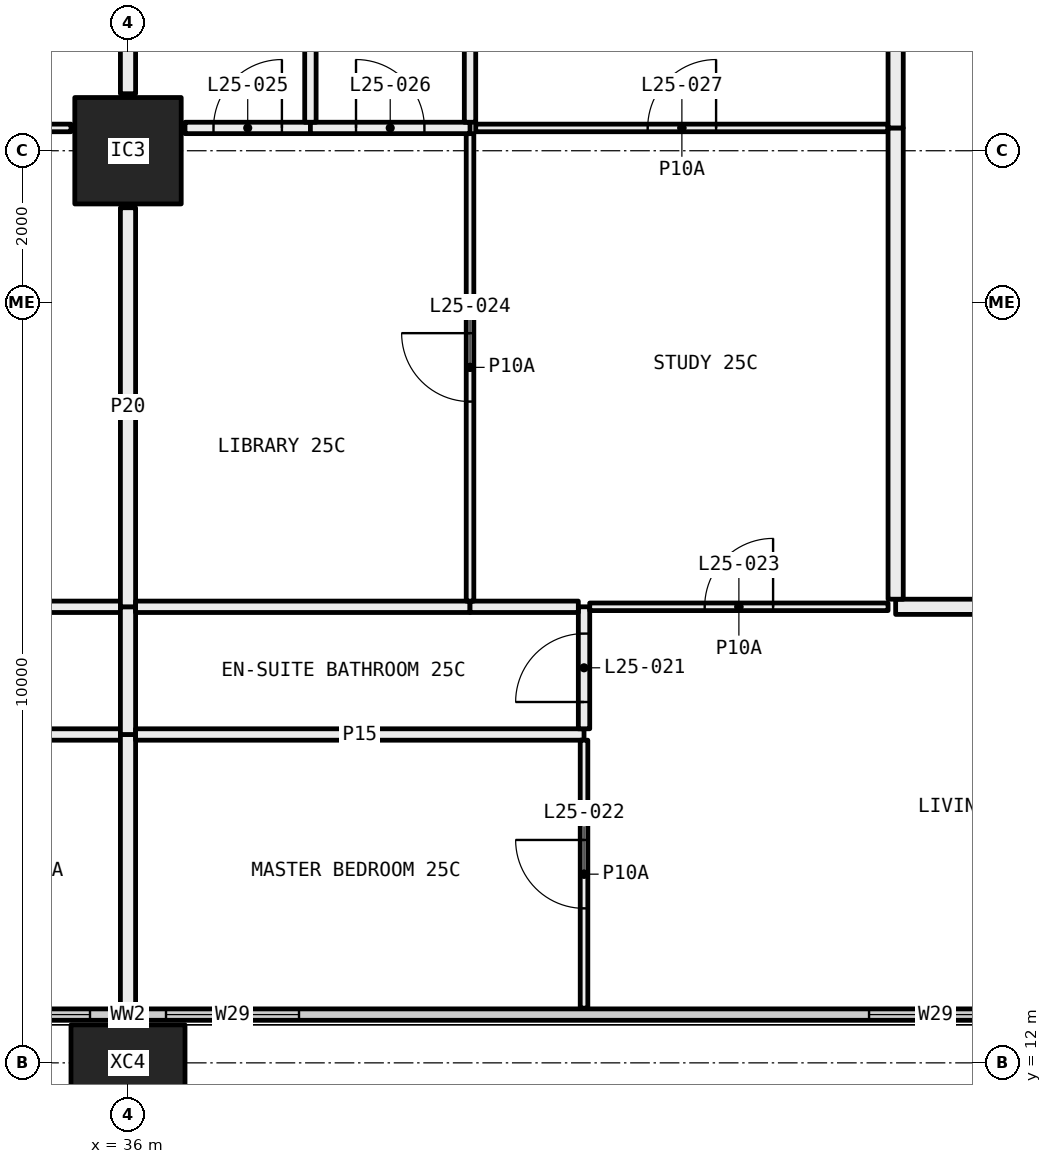
"""IFC4 building model, lengths in metres.
Left out: names, types, materials, properties, quantities, classifications, styles, units other than length and angle.
Written with IfcOpenShell. Run it as: python <this file> out.ifc"""

import sys

from ifc_helpers import new_model, si_unit, direction, frame, frame_2d, origin, origin_2d, place, context, subcontext, project, spatial, rectangle, hollow_rectangle, extrude, element, fill, save


model = new_model("IFC4")
c1 = context("Model", 3, precision=1e-05, world=origin(), true_north=direction((0.0, 1.0)))
c2 = subcontext(c1, "Body", "Model", "MODEL_VIEW")
j1 = project(units=[si_unit("LENGTHUNIT", "METRE"), si_unit("PLANEANGLEUNIT", "RADIAN")], contexts=[c1])
p1 = place(None, origin())
s1 = spatial("IfcSite", under=j1, at=p1, CompositionType="ELEMENT")
p2 = place(p1, origin())
s2 = spatial("IfcBuilding", under=s1, at=p2, CompositionType="ELEMENT")
p3 = place(p2, frame((0.0, 0.0, 100.05)))
s3 = spatial("IfcBuildingStorey", under=s2, at=p3, CompositionType="ELEMENT", Elevation=100.05)
p4 = place(p3, frame((36.0, 12.0, -0.4), z_axis=(0.0, 0.0, 1.0), x_axis=(1.0, 0.0, 0.0)))
e1 = element("IfcColumn", 1, at=p4, inside=s3, PredefinedType="COLUMN", context=c2, shape_type="SweptSolid", body=[
    extrude(hollow_rectangle(XDim=1.5, YDim=1.0, WallThickness=0.06, at=origin_2d()), origin(), (0.0, 0.0, 1.0), 3.45),
])
p5 = place(p3, frame((36.0, 24.0, 0.0), z_axis=(0.0, 0.0, 1.0), x_axis=(1.0, 0.0, 0.0)))
e2 = element("IfcColumn", 2, at=p5, inside=s3, PredefinedType="COLUMN", context=c2, shape_type="SweptSolid", body=[
    extrude(hollow_rectangle(XDim=1.4, YDim=1.4, WallThickness=0.06, at=origin_2d()), origin(), (0.0, 0.0, 1.0), 3.05),
])
p6 = place(p3, frame((6.56, 12.635, 0.0), z_axis=(0.0, 0.0, 1.0), x_axis=(1.0, 0.0, 0.0)))
e3 = element("IfcWall", 3, at=p6, inside=s3, PredefinedType="ELEMENTEDWALL", context=c2, shape_type="SweptSolid", body=[
    extrude(rectangle(XDim=58.88, YDim=0.15, at=frame_2d((29.44, 0.0))), origin(), (0.0, 0.0, 1.0), 3.05),
])
p7 = place(p6, frame((0.44, 0.0, 0.45)))
e4 = element("IfcOpeningElement", 4, at=p7, cuts=e3, PredefinedType="OPENING", context=c2, shape_type="SweptSolid", body=[
    extrude(rectangle(XDim=4.5, YDim=2.55, at=frame_2d((2.25, 1.275))), frame((0.0, 0.085, 0.0), z_axis=(0.0, -1.0, 0.0), x_axis=(1.0, 0.0, 0.0)), (0.0, 0.0, 1.0), 0.17),
])
p8 = place(p6, frame((5.94, 0.0, 0.45)))
e5 = element("IfcOpeningElement", 5, at=p8, cuts=e3, PredefinedType="OPENING", context=c2, shape_type="SweptSolid", body=[
    extrude(rectangle(XDim=1.75, YDim=2.55, at=frame_2d((0.875, 1.275))), frame((0.0, 0.085, 0.0), z_axis=(0.0, -1.0, 0.0), x_axis=(1.0, 0.0, 0.0)), (0.0, 0.0, 1.0), 0.17),
])
p9 = place(p6, frame((15.19, 0.0, 0.45)))
e6 = element("IfcOpeningElement", 6, at=p9, cuts=e3, PredefinedType="OPENING", context=c2, shape_type="SweptSolid", body=[
    extrude(rectangle(XDim=1.75, YDim=2.55, at=frame_2d((0.875, 1.275))), frame((0.0, 0.085, 0.0), z_axis=(0.0, -1.0, 0.0), x_axis=(1.0, 0.0, 0.0)), (0.0, 0.0, 1.0), 0.17),
])
p10 = place(p6, frame((17.94, 0.0, 0.45)))
e7 = element("IfcOpeningElement", 7, at=p10, cuts=e3, PredefinedType="OPENING", context=c2, shape_type="SweptSolid", body=[
    extrude(rectangle(XDim=1.75, YDim=2.55, at=frame_2d((0.875, 1.275))), frame((0.0, 0.085, 0.0), z_axis=(0.0, -1.0, 0.0), x_axis=(1.0, 0.0, 0.0)), (0.0, 0.0, 1.0), 0.17),
])
p11 = place(p6, frame((27.19, 0.0, 0.45)))
e8 = element("IfcOpeningElement", 8, at=p11, cuts=e3, PredefinedType="OPENING", context=c2, shape_type="SweptSolid", body=[
    extrude(rectangle(XDim=1.75, YDim=2.55, at=frame_2d((0.875, 1.275))), frame((0.0, 0.085, 0.0), z_axis=(0.0, -1.0, 0.0), x_axis=(1.0, 0.0, 0.0)), (0.0, 0.0, 1.0), 0.17),
])
p12 = place(p6, frame((29.94, 0.0, 0.45)))
e9 = element("IfcOpeningElement", 9, at=p12, cuts=e3, PredefinedType="OPENING", context=c2, shape_type="SweptSolid", body=[
    extrude(rectangle(XDim=1.75, YDim=2.55, at=frame_2d((0.875, 1.275))), frame((0.0, 0.085, 0.0), z_axis=(0.0, -1.0, 0.0), x_axis=(1.0, 0.0, 0.0)), (0.0, 0.0, 1.0), 0.17),
])
p13 = place(p6, frame((39.19, 0.0, 0.45)))
e10 = element("IfcOpeningElement", 10, at=p13, cuts=e3, PredefinedType="OPENING", context=c2, shape_type="SweptSolid", body=[
    extrude(rectangle(XDim=1.75, YDim=2.55, at=frame_2d((0.875, 1.275))), frame((0.0, 0.085, 0.0), z_axis=(0.0, -1.0, 0.0), x_axis=(1.0, 0.0, 0.0)), (0.0, 0.0, 1.0), 0.17),
])
p14 = place(p6, frame((41.94, 0.0, 0.45)))
e11 = element("IfcOpeningElement", 11, at=p14, cuts=e3, PredefinedType="OPENING", context=c2, shape_type="SweptSolid", body=[
    extrude(rectangle(XDim=1.75, YDim=2.55, at=frame_2d((0.875, 1.275))), frame((0.0, 0.085, 0.0), z_axis=(0.0, -1.0, 0.0), x_axis=(1.0, 0.0, 0.0)), (0.0, 0.0, 1.0), 0.17),
])
p15 = place(p6, frame((51.19, 0.0, 0.45)))
e12 = element("IfcOpeningElement", 12, at=p15, cuts=e3, PredefinedType="OPENING", context=c2, shape_type="SweptSolid", body=[
    extrude(rectangle(XDim=1.75, YDim=2.55, at=frame_2d((0.875, 1.275))), frame((0.0, 0.085, 0.0), z_axis=(0.0, -1.0, 0.0), x_axis=(1.0, 0.0, 0.0)), (0.0, 0.0, 1.0), 0.17),
])
p16 = place(p6, frame((53.94, 0.0, 0.45)))
e13 = element("IfcOpeningElement", 13, at=p16, cuts=e3, PredefinedType="OPENING", context=c2, shape_type="SweptSolid", body=[
    extrude(rectangle(XDim=4.5, YDim=2.55, at=frame_2d((2.25, 1.275))), frame((0.0, 0.085, 0.0), z_axis=(0.0, -1.0, 0.0), x_axis=(1.0, 0.0, 0.0)), (0.0, 0.0, 1.0), 0.17),
])
p17 = place(p3, frame((35.9, 16.32, 0.0), z_axis=(0.0, 0.0, 1.0), x_axis=(-1.0, 0.0, 0.0)))
e14 = element("IfcWall", 14, at=p17, inside=s3, PredefinedType="PARTITIONING", context=c2, shape_type="SweptSolid", body=[
    extrude(rectangle(XDim=5.825, YDim=0.15, at=frame_2d((2.913, 0.0))), origin(), (0.0, 0.0, 1.0), 3.05),
])
p18 = place(p3, frame((36.0, 12.72, 0.0), z_axis=(0.0, 0.0, 1.0), x_axis=(0.0, 1.0, 0.0)))
e15 = element("IfcWall", 15, at=p18, inside=s3, PredefinedType="PARTITIONING", context=c2, shape_type="SweptSolid", body=[
    extrude(rectangle(XDim=3.6, YDim=0.2, at=frame_2d((1.8, 0.0))), origin(), (0.0, 0.0, 1.0), 2.45),
])
p19 = place(p3, frame((35.9, 18.0, 0.0), z_axis=(0.0, 0.0, 1.0), x_axis=(-1.0, 0.0, 0.0)))
e16 = element("IfcWall", 16, at=p19, inside=s3, PredefinedType="PARTITIONING", context=c2, shape_type="SweptSolid", body=[
    extrude(rectangle(XDim=4.4, YDim=0.15, at=frame_2d((2.2, 0.0))), origin(), (0.0, 0.0, 1.0), 3.05),
])
p20 = place(p3, frame((36.0, 16.32, 0.0), z_axis=(0.0, 0.0, 1.0), x_axis=(0.0, 1.0, 0.0)))
e17 = element("IfcWall", 17, at=p20, inside=s3, PredefinedType="PARTITIONING", context=c2, shape_type="SweptSolid", body=[
    extrude(rectangle(XDim=1.68, YDim=0.2, at=frame_2d((0.84, 0.0))), origin(), (0.0, 0.0, 1.0), 2.45),
])
p21 = place(p3, frame((35.25, 24.3, 0.0), z_axis=(0.0, 0.0, 1.0), x_axis=(-1.0, 0.0, 0.0)))
e18 = element("IfcWall", 18, at=p21, inside=s3, PredefinedType="PARTITIONING", context=c2, shape_type="SweptSolid", body=[
    extrude(rectangle(XDim=3.7, YDim=0.1, at=frame_2d((1.85, 0.0))), origin(), (0.0, 0.0, 1.0), 3.05),
])
p22 = place(p21, frame((1.4, 0.0, 0.0)))
e19 = element("IfcOpeningElement", 19, at=p22, cuts=e18, PredefinedType="OPENING", context=c2, shape_type="SweptSolid", body=[
    extrude(rectangle(XDim=0.9, YDim=2.1, at=frame_2d((0.45, 1.05))), frame((0.0, 0.06, 0.0), z_axis=(0.0, -1.0, 0.0), x_axis=(1.0, 0.0, 0.0)), (0.0, 0.0, 1.0), 0.12),
])
p23 = place(p3, frame((36.0, 18.0, 0.0), z_axis=(0.0, 0.0, 1.0), x_axis=(0.0, 1.0, 0.0)))
e20 = element("IfcWall", 20, at=p23, inside=s3, PredefinedType="PARTITIONING", context=c2, shape_type="SweptSolid", body=[
    extrude(rectangle(XDim=5.25, YDim=0.2, at=frame_2d((2.625, 0.0))), origin(), (0.0, 0.0, 1.0), 2.45),
])
p24 = place(p3, frame((36.0, 24.75, 0.0), z_axis=(0.0, 0.0, 1.0), x_axis=(0.0, 1.0, 0.0)))
e21 = element("IfcWall", 21, at=p24, inside=s3, PredefinedType="PARTITIONING", context=c2, shape_type="SweptSolid", body=[
    extrude(rectangle(XDim=1.8, YDim=0.2, at=frame_2d((0.9, 0.0))), origin(), (0.0, 0.0, 1.0), 2.45),
])
p25 = place(p3, frame((42.0, 16.32, 0.0), z_axis=(0.0, 0.0, 1.0), x_axis=(-1.0, 0.0, 0.0)))
e22 = element("IfcWall", 22, at=p25, inside=s3, PredefinedType="PARTITIONING", context=c2, shape_type="SweptSolid", body=[
    extrude(rectangle(XDim=5.9, YDim=0.15, at=frame_2d((2.95, 0.0))), origin(), (0.0, 0.0, 1.0), 3.05),
])
p26 = place(p3, frame((42.0, 12.72, 0.0), z_axis=(0.0, 0.0, 1.0), x_axis=(0.0, 1.0, 0.0)))
e23 = element("IfcWall", 23, at=p26, inside=s3, PredefinedType="PARTITIONING", context=c2, shape_type="SweptSolid", body=[
    extrude(rectangle(XDim=3.525, YDim=0.1, at=frame_2d((1.763, 0.0))), origin(), (0.0, 0.0, 1.0), 3.05),
])
p27 = place(p26, frame((1.312, 0.0, 0.0)))
e24 = element("IfcOpeningElement", 24, at=p27, cuts=e23, PredefinedType="OPENING", context=c2, shape_type="SweptSolid", body=[
    extrude(rectangle(XDim=0.9, YDim=2.1, at=frame_2d((0.45, 1.05))), frame((0.0, 0.06, 0.0), z_axis=(0.0, -1.0, 0.0), x_axis=(1.0, 0.0, 0.0)), (0.0, 0.0, 1.0), 0.12),
])
p28 = place(p3, frame((42.0, 16.395, 0.0), z_axis=(0.0, 0.0, 1.0), x_axis=(0.0, 1.0, 0.0)))
e25 = element("IfcWall", 25, at=p28, inside=s3, PredefinedType="PARTITIONING", context=c2, shape_type="SweptSolid", body=[
    extrude(rectangle(XDim=1.605, YDim=0.15, at=frame_2d((0.802, 0.0))), origin(), (0.0, 0.0, 1.0), 3.05),
])
p29 = place(p28, frame((0.353, 0.0, 0.0)))
e26 = element("IfcOpeningElement", 26, at=p29, cuts=e25, PredefinedType="OPENING", context=c2, shape_type="SweptSolid", body=[
    extrude(rectangle(XDim=0.9, YDim=2.1, at=frame_2d((0.45, 1.05))), frame((0.0, 0.085, 0.0), z_axis=(0.0, -1.0, 0.0), x_axis=(1.0, 0.0, 0.0)), (0.0, 0.0, 1.0), 0.17),
])
p30 = place(p3, frame((40.5, 18.0, 0.0), z_axis=(0.0, 0.0, 1.0), x_axis=(-1.0, 0.0, 0.0)))
e27 = element("IfcWall", 27, at=p30, inside=s3, PredefinedType="PARTITIONING", context=c2, shape_type="SweptSolid", body=[
    extrude(rectangle(XDim=4.4, YDim=0.15, at=frame_2d((2.2, 0.0))), origin(), (0.0, 0.0, 1.0), 3.05),
])
p31 = place(p3, frame((41.925, 18.0, 0.0), z_axis=(0.0, 0.0, 1.0), x_axis=(-1.0, 0.0, 0.0)))
e28 = element("IfcWall", 28, at=p31, inside=s3, PredefinedType="PARTITIONING", context=c2, shape_type="SweptSolid", body=[
    extrude(rectangle(XDim=1.425, YDim=0.15, at=frame_2d((0.712, 0.0))), origin(), (0.0, 0.0, 1.0), 3.05),
])
p32 = place(p3, frame((46.0, 18.0, 0.0), z_axis=(0.0, 0.0, 1.0), x_axis=(-1.0, 0.0, 0.0)))
e29 = element("IfcWall", 29, at=p32, inside=s3, PredefinedType="PARTITIONING", context=c2, shape_type="SweptSolid", body=[
    extrude(rectangle(XDim=3.925, YDim=0.1, at=frame_2d((1.962, 0.0))), origin(), (0.0, 0.0, 1.0), 3.05),
])
p33 = place(p32, frame((1.512, 0.0, 0.0)))
e30 = element("IfcOpeningElement", 30, at=p33, cuts=e29, PredefinedType="OPENING", context=c2, shape_type="SweptSolid", body=[
    extrude(rectangle(XDim=0.9, YDim=2.1, at=frame_2d((0.45, 1.05))), frame((0.0, 0.06, 0.0), z_axis=(0.0, -1.0, 0.0), x_axis=(1.0, 0.0, 0.0)), (0.0, 0.0, 1.0), 0.12),
])
p34 = place(p3, frame((54.0, 18.0, 0.0), z_axis=(0.0, 0.0, 1.0), x_axis=(-1.0, 0.0, 0.0)))
e31 = element("IfcWall", 31, at=p34, inside=s3, PredefinedType="PARTITIONING", context=c2, shape_type="SweptSolid", body=[
    extrude(rectangle(XDim=7.9, YDim=0.2, at=frame_2d((3.95, 0.0))), origin(), (0.0, 0.0, 1.0), 3.05),
])
p35 = place(p3, frame((40.5, 18.075, 0.0), z_axis=(0.0, 0.0, 1.0), x_axis=(0.0, 1.0, 0.0)))
e32 = element("IfcWall", 32, at=p35, inside=s3, PredefinedType="PARTITIONING", context=c2, shape_type="SweptSolid", body=[
    extrude(rectangle(XDim=6.15, YDim=0.1, at=frame_2d((3.075, 0.0))), origin(), (0.0, 0.0, 1.0), 2.45),
])
p36 = place(p35, frame((2.625, 0.0, 0.0)))
e33 = element("IfcOpeningElement", 33, at=p36, cuts=e32, PredefinedType="OPENING", context=c2, shape_type="SweptSolid", body=[
    extrude(rectangle(XDim=0.9, YDim=2.1, at=frame_2d((0.45, 1.05))), frame((0.0, 0.06, 0.0), z_axis=(0.0, -1.0, 0.0), x_axis=(1.0, 0.0, 0.0)), (0.0, 0.0, 1.0), 0.12),
])
p37 = place(p3, frame((38.4, 24.3, 0.0), z_axis=(0.0, 0.0, 1.0), x_axis=(-1.0, 0.0, 0.0)))
e34 = element("IfcWall", 34, at=p37, inside=s3, PredefinedType="PARTITIONING", context=c2, shape_type="SweptSolid", body=[
    extrude(rectangle(XDim=1.65, YDim=0.15, at=frame_2d((0.825, 0.0))), origin(), (0.0, 0.0, 1.0), 3.05),
])
p38 = place(p37, frame((0.375, 0.0, 0.0)))
e35 = element("IfcOpeningElement", 35, at=p38, cuts=e34, PredefinedType="OPENING", context=c2, shape_type="SweptSolid", body=[
    extrude(rectangle(XDim=0.9, YDim=2.1, at=frame_2d((0.45, 1.05))), frame((0.0, 0.085, 0.0), z_axis=(0.0, -1.0, 0.0), x_axis=(1.0, 0.0, 0.0)), (0.0, 0.0, 1.0), 0.17),
])
p39 = place(p3, frame((40.5, 24.3, 0.0), z_axis=(0.0, 0.0, 1.0), x_axis=(-1.0, 0.0, 0.0)))
e36 = element("IfcWall", 36, at=p39, inside=s3, PredefinedType="PARTITIONING", context=c2, shape_type="SweptSolid", body=[
    extrude(rectangle(XDim=2.1, YDim=0.15, at=frame_2d((1.05, 0.0))), origin(), (0.0, 0.0, 1.0), 3.05),
])
p40 = place(p39, frame((0.6, 0.0, 0.0)))
e37 = element("IfcOpeningElement", 37, at=p40, cuts=e36, PredefinedType="OPENING", context=c2, shape_type="SweptSolid", body=[
    extrude(rectangle(XDim=0.9, YDim=2.1, at=frame_2d((0.45, 1.05))), frame((0.0, 0.085, 0.0), z_axis=(0.0, -1.0, 0.0), x_axis=(1.0, 0.0, 0.0)), (0.0, 0.0, 1.0), 0.17),
])
p41 = place(p3, frame((46.0, 24.3, 0.0), z_axis=(0.0, 0.0, 1.0), x_axis=(-1.0, 0.0, 0.0)))
e38 = element("IfcWall", 38, at=p41, inside=s3, PredefinedType="PARTITIONING", context=c2, shape_type="SweptSolid", body=[
    extrude(rectangle(XDim=5.425, YDim=0.1, at=frame_2d((2.712, 0.0))), origin(), (0.0, 0.0, 1.0), 3.05),
])
p42 = place(p41, frame((2.262, 0.0, 0.0)))
e39 = element("IfcOpeningElement", 39, at=p42, cuts=e38, PredefinedType="OPENING", context=c2, shape_type="SweptSolid", body=[
    extrude(rectangle(XDim=0.9, YDim=2.1, at=frame_2d((0.45, 1.05))), frame((0.0, 0.06, 0.0), z_axis=(0.0, -1.0, 0.0), x_axis=(1.0, 0.0, 0.0)), (0.0, 0.0, 1.0), 0.12),
])
p43 = place(p3, frame((46.1, 18.1, 0.0), z_axis=(0.0, 0.0, 1.0), x_axis=(0.0, 1.0, 0.0)))
e40 = element("IfcWall", 40, at=p43, inside=s3, PredefinedType="PARTITIONING", context=c2, shape_type="SweptSolid", body=[
    extrude(rectangle(XDim=6.2, YDim=0.2, at=frame_2d((3.1, 0.0))), origin(), (0.0, 0.0, 1.0), 2.45),
])
p44 = place(p3, frame((38.4, 24.375, 0.0), z_axis=(0.0, 0.0, 1.0), x_axis=(0.0, 1.0, 0.0)))
e41 = element("IfcWall", 41, at=p44, inside=s3, PredefinedType="PARTITIONING", context=c2, shape_type="SweptSolid", body=[
    extrude(rectangle(XDim=2.1, YDim=0.15, at=frame_2d((1.05, 0.0))), origin(), (0.0, 0.0, 1.0), 3.05),
])
p45 = place(p3, frame((40.5, 24.375, 0.0), z_axis=(0.0, 0.0, 1.0), x_axis=(0.0, 1.0, 0.0)))
e42 = element("IfcWall", 42, at=p45, inside=s3, PredefinedType="PARTITIONING", context=c2, shape_type="SweptSolid", body=[
    extrude(rectangle(XDim=4.325, YDim=0.15, at=frame_2d((2.163, 0.0))), origin(), (0.0, 0.0, 1.0), 3.05),
])
p46 = place(p3, frame((46.1, 24.3, 0.0), z_axis=(0.0, 0.0, 1.0), x_axis=(0.0, 1.0, 0.0)))
e43 = element("IfcWall", 43, at=p46, inside=s3, PredefinedType="PARTITIONING", context=c2, shape_type="SweptSolid", body=[
    extrude(rectangle(XDim=4.5, YDim=0.2, at=frame_2d((2.25, 0.0))), origin(), (0.0, 0.0, 1.0), 3.05),
])
p47 = place(p11, origin())
e44 = element("IfcWindow", 44, at=p47, inside=s3, PartitioningType="SINGLE_PANEL", PredefinedType="WINDOW", context=c2, shape_type="SweptSolid", body=[
    extrude(rectangle(XDim=1.75, YDim=2.55, at=frame_2d((0.875, 1.275))), frame((0.0, 0.03, 0.0), z_axis=(0.0, -1.0, 0.0), x_axis=(1.0, 0.0, 0.0)), (0.0, 0.0, 1.0), 0.06),
])
fill(e8, e44)
p48 = place(p12, origin())
e45 = element("IfcWindow", 45, at=p48, inside=s3, PartitioningType="SINGLE_PANEL", PredefinedType="WINDOW", context=c2, shape_type="SweptSolid", body=[
    extrude(rectangle(XDim=1.75, YDim=2.55, at=frame_2d((0.875, 1.275))), frame((0.0, 0.03, 0.0), z_axis=(0.0, -1.0, 0.0), x_axis=(1.0, 0.0, 0.0)), (0.0, 0.0, 1.0), 0.06),
])
fill(e9, e45)
p49 = place(p13, origin())
e46 = element("IfcWindow", 46, at=p49, inside=s3, PartitioningType="SINGLE_PANEL", PredefinedType="WINDOW", context=c2, shape_type="SweptSolid", body=[
    extrude(rectangle(XDim=1.75, YDim=2.55, at=frame_2d((0.875, 1.275))), frame((0.0, 0.03, 0.0), z_axis=(0.0, -1.0, 0.0), x_axis=(1.0, 0.0, 0.0)), (0.0, 0.0, 1.0), 0.06),
])
fill(e10, e46)
p50 = place(p29, origin())
e47 = element("IfcDoor", 47, at=p50, inside=s3, OperationType="SINGLE_SWING_RIGHT", PredefinedType="DOOR", context=c2, shape_type="SweptSolid", body=[
    extrude(rectangle(XDim=0.9, YDim=2.1, at=frame_2d((0.45, 1.05))), frame((0.0, 0.025, 0.0), z_axis=(0.0, -1.0, 0.0), x_axis=(1.0, 0.0, 0.0)), (0.0, 0.0, 1.0), 0.05),
])
fill(e26, e47)
p51 = place(p27, origin())
e48 = element("IfcDoor", 48, at=p51, inside=s3, OperationType="SINGLE_SWING_LEFT", PredefinedType="DOOR", context=c2, shape_type="SweptSolid", body=[
    extrude(rectangle(XDim=0.9, YDim=2.1, at=frame_2d((0.45, 1.05))), frame((0.0, 0.025, 0.0), z_axis=(0.0, -1.0, 0.0), x_axis=(1.0, 0.0, 0.0)), (0.0, 0.0, 1.0), 0.05),
])
fill(e24, e48)
p52 = place(p33, frame((0.9, 0.0, 0.0), x_axis=(-1.0, 0.0, 0.0)))
e49 = element("IfcDoor", 49, at=p52, inside=s3, OperationType="SINGLE_SWING_LEFT", PredefinedType="DOOR", context=c2, shape_type="SweptSolid", body=[
    extrude(rectangle(XDim=0.9, YDim=2.1, at=frame_2d((0.45, 1.05))), frame((0.0, 0.025, 0.0), z_axis=(0.0, -1.0, 0.0), x_axis=(1.0, 0.0, 0.0)), (0.0, 0.0, 1.0), 0.05),
])
fill(e30, e49)
p53 = place(p36, origin())
e50 = element("IfcDoor", 50, at=p53, inside=s3, OperationType="SINGLE_SWING_LEFT", PredefinedType="DOOR", context=c2, shape_type="SweptSolid", body=[
    extrude(rectangle(XDim=0.9, YDim=2.1, at=frame_2d((0.45, 1.05))), frame((0.0, 0.025, 0.0), z_axis=(0.0, -1.0, 0.0), x_axis=(1.0, 0.0, 0.0)), (0.0, 0.0, 1.0), 0.05),
])
fill(e33, e50)
p54 = place(p38, frame((0.9, 0.0, 0.0), x_axis=(-1.0, 0.0, 0.0)))
e51 = element("IfcDoor", 51, at=p54, inside=s3, OperationType="SINGLE_SWING_LEFT", PredefinedType="DOOR", context=c2, shape_type="SweptSolid", body=[
    extrude(rectangle(XDim=0.9, YDim=2.1, at=frame_2d((0.45, 1.05))), frame((0.0, 0.025, 0.0), z_axis=(0.0, -1.0, 0.0), x_axis=(1.0, 0.0, 0.0)), (0.0, 0.0, 1.0), 0.05),
])
fill(e35, e51)
p55 = place(p40, frame((0.9, 0.0, 0.0), x_axis=(-1.0, 0.0, 0.0)))
e52 = element("IfcDoor", 52, at=p55, inside=s3, OperationType="SINGLE_SWING_RIGHT", PredefinedType="DOOR", context=c2, shape_type="SweptSolid", body=[
    extrude(rectangle(XDim=0.9, YDim=2.1, at=frame_2d((0.45, 1.05))), frame((0.0, 0.025, 0.0), z_axis=(0.0, -1.0, 0.0), x_axis=(1.0, 0.0, 0.0)), (0.0, 0.0, 1.0), 0.05),
])
fill(e37, e52)
p56 = place(p42, frame((0.9, 0.0, 0.0), x_axis=(-1.0, 0.0, 0.0)))
e53 = element("IfcDoor", 53, at=p56, inside=s3, OperationType="SINGLE_SWING_LEFT", PredefinedType="DOOR", context=c2, shape_type="SweptSolid", body=[
    extrude(rectangle(XDim=0.9, YDim=2.1, at=frame_2d((0.45, 1.05))), frame((0.0, 0.025, 0.0), z_axis=(0.0, -1.0, 0.0), x_axis=(1.0, 0.0, 0.0)), (0.0, 0.0, 1.0), 0.05),
])
fill(e39, e53)
save(model, sys.argv[1])
